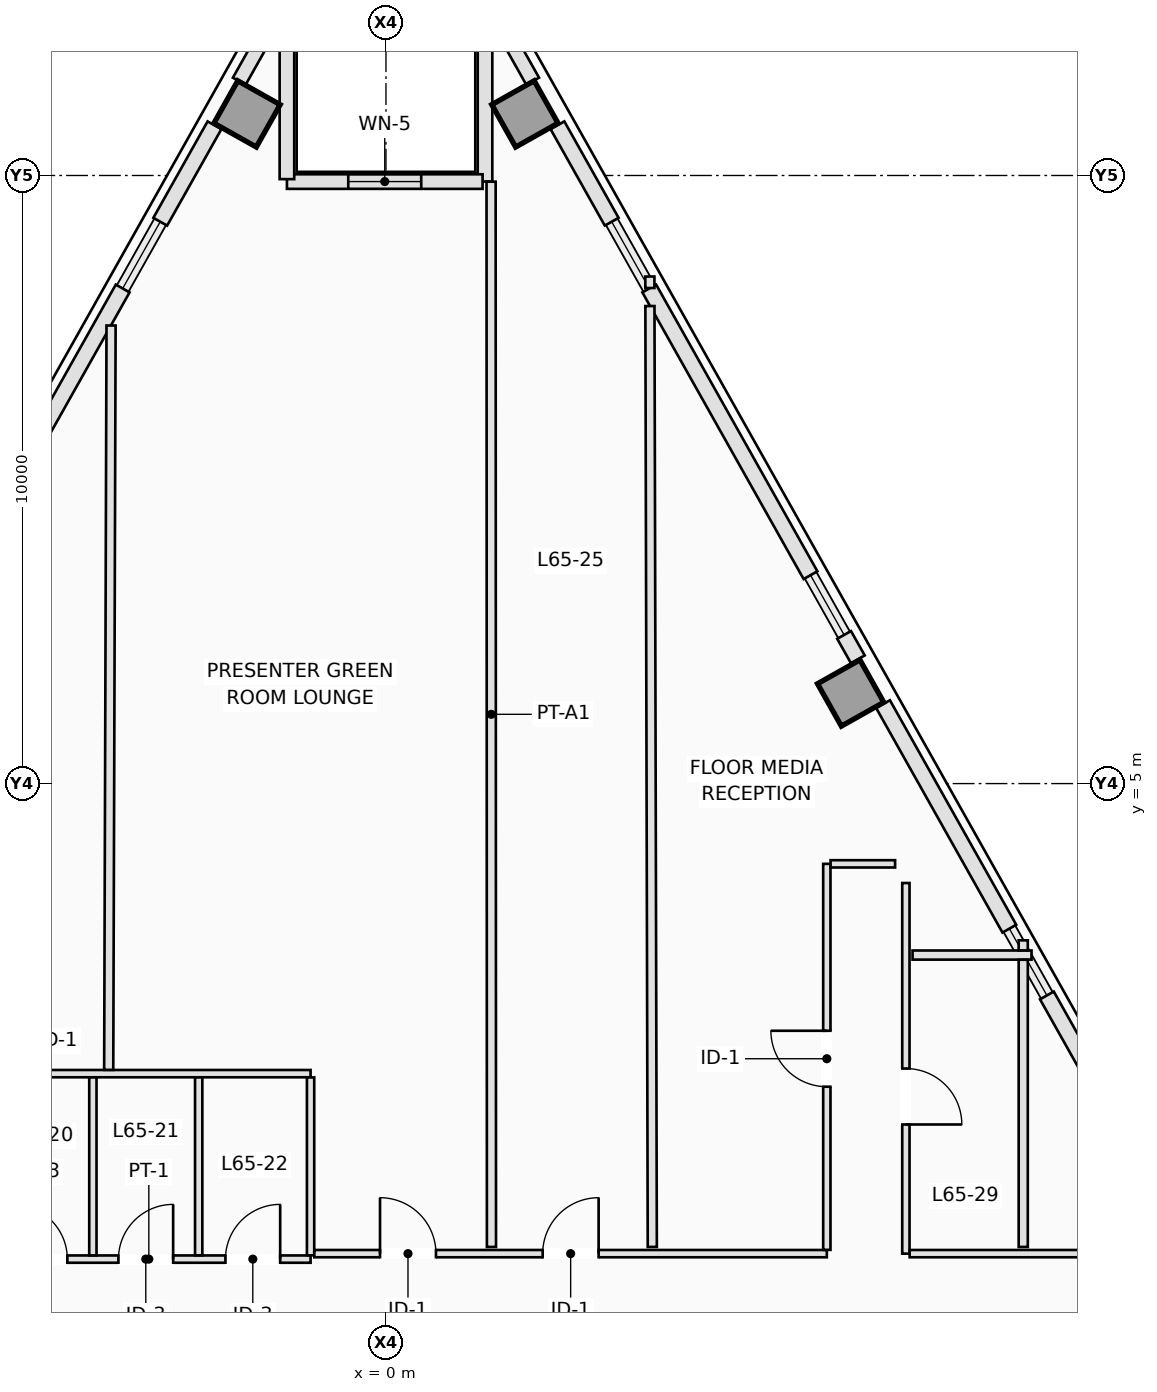
"""IFC4 building model, lengths in metres.
Left out: names, types, materials, properties, quantities, classifications, styles, units other than length and angle.
Written with IfcOpenShell. Run it as: python <this file> out.ifc"""

import sys

from ifc_helpers import new_model, si_unit, direction, frame, frame_2d, origin, origin_2d, place, context, subcontext, project, spatial, rectangle, extrude, element, fill, save


model = new_model("IFC4")
c1 = context("Model", 3, precision=1e-05, world=origin(), true_north=direction((0.0, 1.0)))
c2 = subcontext(c1, "Body", "Model", "MODEL_VIEW")
j1 = project(units=[si_unit("LENGTHUNIT", "METRE"), si_unit("PLANEANGLEUNIT", "RADIAN")], contexts=[c1])
p1 = place(None, origin())
s1 = spatial("IfcSite", under=j1, at=p1, CompositionType="ELEMENT")
p2 = place(p1, origin())
s2 = spatial("IfcBuilding", under=s1, at=p2, CompositionType="ELEMENT")
p3 = place(p2, frame((0.0, 0.0, 235.9)))
s3 = spatial("IfcBuildingStorey", under=s2, at=p3, CompositionType="ELEMENT", Elevation=235.9)
for number, where, z_axis, x_axis in (
    (1, (7.642, 6.489, 0.0), (0.0, 0.0, 1.0), (0.872, 0.49, 0.0)),
    (2, (2.285, 16.012, 0.0), (0.0, 0.0, 1.0), (0.872, 0.49, 0.0)),
    (3, (-2.285, 16.012, 0.0), (0.0, 0.0, 1.0), (-0.872, 0.49, 0.0)),
):
    element("IfcColumn", number, at=place(p3, frame(where, z_axis=z_axis, x_axis=x_axis)), inside=s3, PredefinedType="COLUMN", context=c2, shape_type="SweptSolid", body=[
        extrude(rectangle(XDim=0.8, YDim=0.8, at=origin_2d()), origin(), (0.0, 0.0, 1.0), 3.5),
    ])
p4 = place(p3, frame((1.95, 17.373, 0.0), z_axis=(0.0, 0.0, 1.0), x_axis=(0.490199895283, -0.871610040479, 0.0)))
e4 = element("IfcWall", 4, at=p4, inside=s3, PredefinedType="STANDARD", context=c2, shape_type="SweptSolid", body=[
    extrude(rectangle(XDim=0.945, YDim=0.24, at=frame_2d((0.472, 0.0))), origin(), (0.0, 0.0, 1.0), 3.25),
])
p5 = place(p3, frame((2.82, 15.826, 0.0), z_axis=(0.0, 0.0, 1.0), x_axis=(0.490261239633, -0.871575537125, 0.0)))
e5 = element("IfcWall", 5, at=p5, inside=s3, PredefinedType="STANDARD", context=c2, shape_type="SweptSolid", body=[
    extrude(rectangle(XDim=1.82, YDim=0.26, at=frame_2d((0.91, 0.0))), origin(), (0.0, 0.0, 1.0), 3.25),
])
p6 = place(p3, frame((4.33, 13.142, 0.0), z_axis=(0.0, 0.0, 1.0), x_axis=(0.490265525523, -0.871573126297, 0.0)))
e6 = element("IfcWall", 6, at=p6, inside=s3, PredefinedType="STANDARD", context=c2, shape_type="SweptSolid", body=[
    extrude(rectangle(XDim=5.409, YDim=0.26, at=frame_2d((2.705, 0.0))), origin(), (0.0, 0.0, 1.0), 3.25),
])
p7 = place(p3, frame((7.534, 7.445, 0.0), z_axis=(0.0, 0.0, 1.0), x_axis=(0.490412424957, -0.871490478116, 0.0)))
e7 = element("IfcWall", 7, at=p7, inside=s3, PredefinedType="STANDARD", context=c2, shape_type="SweptSolid", body=[
    extrude(rectangle(XDim=0.46, YDim=0.26, at=frame_2d((0.23, 0.0))), origin(), (0.0, 0.0, 1.0), 3.25),
])
p8 = place(p3, frame((8.174, 6.307, 0.0), z_axis=(0.0, 0.0, 1.0), x_axis=(0.490269447258, -0.871570920284, 0.0)))
e8 = element("IfcWall", 8, at=p8, inside=s3, PredefinedType="STANDARD", context=c2, shape_type="SweptSolid", body=[
    extrude(rectangle(XDim=4.237, YDim=0.26, at=frame_2d((2.118, 0.0))), origin(), (0.0, 0.0, 1.0), 3.25),
])
p9 = place(p3, frame((10.869, 1.516, 0.0), z_axis=(0.0, 0.0, 1.0), x_axis=(0.490244825075, -0.871584770109, 0.0)))
e9 = element("IfcWall", 9, at=p9, inside=s3, PredefinedType="STANDARD", context=c2, shape_type="SweptSolid", body=[
    extrude(rectangle(XDim=4.237, YDim=0.26, at=frame_2d((2.119, 0.0))), origin(), (0.0, 0.0, 1.0), 3.25),
])
p10 = place(p3, frame((-2.413, 16.549, 0.0), z_axis=(0.0, 0.0, 1.0), x_axis=(0.490199895283, 0.871610040479, 0.0)))
e10 = element("IfcWall", 10, at=p10, inside=s3, PredefinedType="STANDARD", context=c2, shape_type="SweptSolid", body=[
    extrude(rectangle(XDim=0.945, YDim=0.24, at=frame_2d((0.472, 0.0))), origin(), (0.0, 0.0, 1.0), 3.25),
])
p11 = place(p3, frame((-6.982, 8.427, 0.0), z_axis=(0.0, 0.0, 1.0), x_axis=(0.490265525523, 0.871573126297, 0.0)))
e11 = element("IfcWall", 11, at=p11, inside=s3, PredefinedType="STANDARD", context=c2, shape_type="SweptSolid", body=[
    extrude(rectangle(XDim=5.409, YDim=0.26, at=frame_2d((2.705, 0.0))), origin(), (0.0, 0.0, 1.0), 3.25),
])
p12 = place(p3, frame((-3.712, 14.24, 0.0), z_axis=(0.0, 0.0, 1.0), x_axis=(0.490261239633, 0.871575537125, 0.0)))
e12 = element("IfcWall", 12, at=p12, inside=s3, PredefinedType="STANDARD", context=c2, shape_type="SweptSolid", body=[
    extrude(rectangle(XDim=1.82, YDim=0.26, at=frame_2d((0.91, 0.0))), origin(), (0.0, 0.0, 1.0), 3.25),
])
p13 = place(p3, frame((1.629, 17.4, 0.0), z_axis=(0.0, 0.0, 1.0), x_axis=(0.0, -1.0, 0.0)))
e13 = element("IfcWall", 13, at=p13, inside=s3, PredefinedType="STANDARD", context=c2, shape_type="SweptSolid", body=[
    extrude(rectangle(XDim=2.5, YDim=0.24, at=frame_2d((1.25, 0.0))), origin(), (0.0, 0.0, 1.0), 3.25),
])
p14 = place(p3, frame((1.589, 14.9, 0.0), z_axis=(0.0, 0.0, 1.0), x_axis=(-1.0, 0.0, 0.0)))
e14 = element("IfcWall", 14, at=p14, inside=s3, PredefinedType="STANDARD", context=c2, shape_type="SweptSolid", body=[
    extrude(rectangle(XDim=3.218, YDim=0.24, at=frame_2d((1.609, 0.0))), origin(), (0.0, 0.0, 1.0), 3.25),
])
p15 = place(p14, frame((1.009, 0.0, 0.9)))
e15 = element("IfcOpeningElement", 15, at=p15, cuts=e14, PredefinedType="OPENING", context=c2, shape_type="SweptSolid", body=[
    extrude(rectangle(XDim=1.2, YDim=1.8, at=frame_2d((0.6, 0.9))), frame((0.0, 0.13, 0.0), z_axis=(0.0, -1.0, 0.0), x_axis=(1.0, 0.0, 0.0)), (0.0, 0.0, 1.0), 0.26),
])
p16 = place(p3, frame((-1.629, 14.94, 0.0), z_axis=(0.0, 0.0, 1.0), x_axis=(0.0, 1.0, 0.0)))
e16 = element("IfcWall", 16, at=p16, inside=s3, PredefinedType="STANDARD", context=c2, shape_type="SweptSolid", body=[
    extrude(rectangle(XDim=2.46, YDim=0.24, at=frame_2d((1.23, 0.0))), origin(), (0.0, 0.0, 1.0), 3.25),
])
p17 = place(p3, frame((-6.56, -2.82, 0.0), z_axis=(0.0, 0.0, 1.0), x_axis=(1.0, 0.0, 0.0)))
e17 = element("IfcWall", 17, at=p17, inside=s3, PredefinedType="PARTITIONING", context=c2, shape_type="SweptSolid", body=[
    extrude(rectangle(XDim=5.32, YDim=0.12, at=frame_2d((2.66, 0.0))), origin(), (0.0, 0.0, 1.0), 2.943),
])
p18 = place(p17, frame((0.42, 0.0, 0.0)))
e18 = element("IfcOpeningElement", 18, at=p18, cuts=e17, PredefinedType="OPENING", context=c2, shape_type="SweptSolid", body=[
    extrude(rectangle(XDim=0.9, YDim=2.12, at=frame_2d((0.45, 1.06))), frame((0.0, 0.07, 0.0), z_axis=(0.0, -1.0, 0.0), x_axis=(1.0, 0.0, 0.0)), (0.0, 0.0, 1.0), 0.14),
])
p19 = place(p17, frame((2.16, 0.0, 0.0)))
e19 = element("IfcOpeningElement", 19, at=p19, cuts=e17, PredefinedType="OPENING", context=c2, shape_type="SweptSolid", body=[
    extrude(rectangle(XDim=0.9, YDim=2.12, at=frame_2d((0.45, 1.06))), frame((0.0, 0.07, 0.0), z_axis=(0.0, -1.0, 0.0), x_axis=(1.0, 0.0, 0.0)), (0.0, 0.0, 1.0), 0.14),
])
p20 = place(p17, frame((3.92, 0.0, 0.0)))
e20 = element("IfcOpeningElement", 20, at=p20, cuts=e17, PredefinedType="OPENING", context=c2, shape_type="SweptSolid", body=[
    extrude(rectangle(XDim=0.9, YDim=2.12, at=frame_2d((0.45, 1.06))), frame((0.0, 0.07, 0.0), z_axis=(0.0, -1.0, 0.0), x_axis=(1.0, 0.0, 0.0)), (0.0, 0.0, 1.0), 0.14),
])
p21 = place(p3, frame((-6.56, 0.23, 0.0), z_axis=(0.0, 0.0, 1.0), x_axis=(1.0, 0.0, 0.0)))
e21 = element("IfcWall", 21, at=p21, inside=s3, PredefinedType="PARTITIONING", context=c2, shape_type="SweptSolid", body=[
    extrude(rectangle(XDim=5.32, YDim=0.12, at=frame_2d((2.66, 0.0))), origin(), (0.0, 0.0, 1.0), 3.25),
])
for number, where, z_axis, x_axis in (
    (22, (-4.82, -2.758, 0.0), (0.0, 0.0, 1.0), (0.0, 1.0, 0.0)),
    (23, (-3.08, -2.758, 0.0), (0.0, 0.0, 1.0), (0.0, 1.0, 0.0)),
    (24, (-1.24, -2.758, 0.0), (0.0, 0.0, 1.0), (0.0, 1.0, 0.0)),
):
    element("IfcWall", number, at=place(p3, frame(where, z_axis=z_axis, x_axis=x_axis)), inside=s3, PredefinedType="PARTITIONING", context=c2, shape_type="SweptSolid", body=[
        extrude(rectangle(XDim=2.926, YDim=0.12, at=frame_2d((1.463, 0.0))), origin(), (0.0, 0.0, 1.0), 3.25),
    ])
p22 = place(p3, frame((-1.178, -2.73, 0.0), z_axis=(0.0, 0.0, 1.0), x_axis=(1.0, 0.0, 0.0)))
e25 = element("IfcWall", 25, at=p22, inside=s3, PredefinedType="PARTITIONING", context=c2, shape_type="SweptSolid", body=[
    extrude(rectangle(XDim=8.428, YDim=0.12, at=frame_2d((4.214, 0.0))), origin(), (0.0, 0.0, 1.0), 2.943),
])
p23 = place(p22, frame((1.08, 0.0, 0.0)))
e26 = element("IfcOpeningElement", 26, at=p23, cuts=e25, PredefinedType="OPENING", context=c2, shape_type="SweptSolid", body=[
    extrude(rectangle(XDim=0.92, YDim=2.12, at=frame_2d((0.46, 1.06))), frame((0.0, 0.07, 0.0), z_axis=(0.0, -1.0, 0.0), x_axis=(1.0, 0.0, 0.0)), (0.0, 0.0, 1.0), 0.14),
])
p24 = place(p22, frame((3.755, 0.0, 0.0)))
e27 = element("IfcOpeningElement", 27, at=p24, cuts=e25, PredefinedType="OPENING", context=c2, shape_type="SweptSolid", body=[
    extrude(rectangle(XDim=0.92, YDim=2.12, at=frame_2d((0.46, 1.06))), frame((0.0, 0.07, 0.0), z_axis=(0.0, -1.0, 0.0), x_axis=(1.0, 0.0, 0.0)), (0.0, 0.0, 1.0), 0.14),
])
p25 = place(p3, frame((7.25, -2.668, 0.0), z_axis=(0.0, 0.0, 1.0), x_axis=(0.0, 1.0, 0.0)))
e28 = element("IfcWall", 28, at=p25, inside=s3, PredefinedType="PARTITIONING", context=c2, shape_type="SweptSolid", body=[
    extrude(rectangle(XDim=6.348, YDim=0.12, at=frame_2d((3.174, 0.0))), origin(), (0.0, 0.0, 1.0), 3.25),
])
p26 = place(p25, frame((2.683, 0.0, 0.0)))
e29 = element("IfcOpeningElement", 29, at=p26, cuts=e28, PredefinedType="OPENING", context=c2, shape_type="SweptSolid", body=[
    extrude(rectangle(XDim=0.92, YDim=2.12, at=frame_2d((0.46, 1.06))), frame((0.0, 0.07, 0.0), z_axis=(0.0, -1.0, 0.0), x_axis=(1.0, 0.0, 0.0)), (0.0, 0.0, 1.0), 0.14),
])
p27 = place(p3, frame((7.312, 3.68, 0.0), z_axis=(0.0, 0.0, 1.0), x_axis=(1.0, 0.0, 0.0)))
e30 = element("IfcWall", 30, at=p27, inside=s3, PredefinedType="PARTITIONING", context=c2, shape_type="SweptSolid", body=[
    extrude(rectangle(XDim=1.061, YDim=0.12, at=frame_2d((0.53, 0.0))), origin(), (0.0, 0.0, 1.0), 3.25),
])
p28 = place(p3, frame((8.55, 3.365, 0.0), z_axis=(0.0, 0.0, 1.0), x_axis=(0.0, -1.0, 0.0)))
e31 = element("IfcWall", 31, at=p28, inside=s3, PredefinedType="PARTITIONING", context=c2, shape_type="SweptSolid", body=[
    extrude(rectangle(XDim=6.095, YDim=0.12, at=frame_2d((3.047, 0.0))), origin(), (0.0, 0.0, 1.0), 3.25),
])
p29 = place(p28, frame((3.051, 0.0, 0.0)))
e32 = element("IfcOpeningElement", 32, at=p29, cuts=e31, PredefinedType="OPENING", context=c2, shape_type="SweptSolid", body=[
    extrude(rectangle(XDim=0.92, YDim=2.12, at=frame_2d((0.46, 1.06))), frame((0.0, 0.07, 0.0), z_axis=(0.0, -1.0, 0.0), x_axis=(1.0, 0.0, 0.0)), (0.0, 0.0, 1.0), 0.14),
])
p30 = place(p3, frame((8.612, -2.73, 0.0), z_axis=(0.0, 0.0, 1.0), x_axis=(1.0, 0.0, 0.0)))
e33 = element("IfcWall", 33, at=p30, inside=s3, PredefinedType="PARTITIONING", context=c2, shape_type="SweptSolid", body=[
    extrude(rectangle(XDim=3.288, YDim=0.12, at=frame_2d((1.644, 0.0))), origin(), (0.0, 0.0, 1.0), 3.25),
])
p31 = place(p3, frame((1.729, 14.898, 0.0), z_axis=(0.0, 0.0, 1.0), x_axis=(0.000334476108, -0.999999944063, 0.0)))
e34 = element("IfcWall", 34, at=p31, inside=s3, PredefinedType="PARTITIONING", context=c2, shape_type="SweptSolid", body=[
    extrude(rectangle(XDim=17.518, YDim=0.15, at=frame_2d((8.759, 0.0))), origin(), (0.0, 0.0, 1.0), 3.25),
])
p32 = place(p3, frame((-4.56, 0.292, 0.0), z_axis=(0.0, 0.0, 1.0), x_axis=(0.003171231411, 0.999994971633, 0.0)))
e35 = element("IfcWall", 35, at=p32, inside=s3, PredefinedType="PARTITIONING", context=c2, shape_type="SweptSolid", body=[
    extrude(rectangle(XDim=12.241, YDim=0.15, at=frame_2d((6.12, 0.0))), origin(), (0.0, 0.0, 1.0), 3.25),
])
p33 = place(p3, frame((4.34, 13.338, 0.0), z_axis=(0.0, 0.0, 1.0), x_axis=(0.002587313462, -0.999996652899, 0.0)))
e36 = element("IfcWall", 36, at=p33, inside=s3, PredefinedType="PARTITIONING", context=c2, shape_type="SweptSolid", body=[
    extrude(rectangle(XDim=0.189, YDim=0.15, at=frame_2d((0.094, 0.0))), origin(), (0.0, 0.0, 1.0), 3.25),
])
p34 = place(p3, frame((4.341, 12.853, 0.0), z_axis=(0.0, 0.0, 1.0), x_axis=(0.002508749087, -0.999996853084, 0.0)))
e37 = element("IfcWall", 37, at=p34, inside=s3, PredefinedType="PARTITIONING", context=c2, shape_type="SweptSolid", body=[
    extrude(rectangle(XDim=15.473, YDim=0.15, at=frame_2d((7.737, 0.0))), origin(), (0.0, 0.0, 1.0), 3.25),
])
p35 = place(p3, frame((10.616, 2.18, 0.0), z_axis=(0.0, 0.0, 1.0), x_axis=(-1.0, 0.0, 0.0)))
e38 = element("IfcWall", 38, at=p35, inside=s3, PredefinedType="PARTITIONING", context=c2, shape_type="SweptSolid", body=[
    extrude(rectangle(XDim=1.956, YDim=0.15, at=frame_2d((0.978, 0.0))), origin(), (0.0, 0.0, 1.0), 3.25),
])
p36 = place(p3, frame((10.48, 2.422, 0.0), z_axis=(0.0, 0.0, 1.0), x_axis=(0.0, -1.0, 0.0)))
e39 = element("IfcWall", 39, at=p36, inside=s3, PredefinedType="PARTITIONING", context=c2, shape_type="SweptSolid", body=[
    extrude(rectangle(XDim=0.165, YDim=0.15, at=frame_2d((0.083, 0.0))), origin(), (0.0, 0.0, 1.0), 3.25),
])
p37 = place(p3, frame((10.48, 2.103, 0.0), z_axis=(0.0, 0.0, 1.0), x_axis=(0.0, -1.0, 0.0)))
e40 = element("IfcWall", 40, at=p37, inside=s3, PredefinedType="PARTITIONING", context=c2, shape_type="SweptSolid", body=[
    extrude(rectangle(XDim=4.723, YDim=0.15, at=frame_2d((2.362, 0.0))), origin(), (0.0, 0.0, 1.0), 3.25),
])
p38 = place(p15, origin())
e41 = element("IfcWindow", 41, at=p38, inside=s3, PartitioningType="SINGLE_PANEL", PredefinedType="WINDOW", context=c2, shape_type="SweptSolid", body=[
    extrude(rectangle(XDim=1.2, YDim=1.8, at=frame_2d((0.6, 0.9))), frame((0.0, 0.03, 0.0), z_axis=(0.0, -1.0, 0.0), x_axis=(1.0, 0.0, 0.0)), (0.0, 0.0, 1.0), 0.06),
])
fill(e15, e41)
p39 = place(p18, origin())
e42 = element("IfcDoor", 42, at=p39, inside=s3, OperationType="SINGLE_SWING_LEFT", PredefinedType="DOOR", context=c2, shape_type="SweptSolid", body=[
    extrude(rectangle(XDim=0.9, YDim=2.12, at=frame_2d((0.45, 1.06))), frame((0.0, 0.025, 0.0), z_axis=(0.0, -1.0, 0.0), x_axis=(1.0, 0.0, 0.0)), (0.0, 0.0, 1.0), 0.05),
])
fill(e18, e42)
p40 = place(p19, origin())
e43 = element("IfcDoor", 43, at=p40, inside=s3, OperationType="SINGLE_SWING_RIGHT", PredefinedType="DOOR", context=c2, shape_type="SweptSolid", body=[
    extrude(rectangle(XDim=0.9, YDim=2.12, at=frame_2d((0.45, 1.06))), frame((0.0, 0.025, 0.0), z_axis=(0.0, -1.0, 0.0), x_axis=(1.0, 0.0, 0.0)), (0.0, 0.0, 1.0), 0.05),
])
fill(e19, e43)
p41 = place(p20, origin())
e44 = element("IfcDoor", 44, at=p41, inside=s3, OperationType="SINGLE_SWING_RIGHT", PredefinedType="DOOR", context=c2, shape_type="SweptSolid", body=[
    extrude(rectangle(XDim=0.9, YDim=2.12, at=frame_2d((0.45, 1.06))), frame((0.0, 0.025, 0.0), z_axis=(0.0, -1.0, 0.0), x_axis=(1.0, 0.0, 0.0)), (0.0, 0.0, 1.0), 0.05),
])
fill(e20, e44)
p42 = place(p23, origin())
e45 = element("IfcDoor", 45, at=p42, inside=s3, OperationType="SINGLE_SWING_LEFT", PredefinedType="DOOR", context=c2, shape_type="SweptSolid", body=[
    extrude(rectangle(XDim=0.92, YDim=2.12, at=frame_2d((0.46, 1.06))), frame((0.0, 0.025, 0.0), z_axis=(0.0, -1.0, 0.0), x_axis=(1.0, 0.0, 0.0)), (0.0, 0.0, 1.0), 0.05),
])
fill(e26, e45)
p43 = place(p24, origin())
e46 = element("IfcDoor", 46, at=p43, inside=s3, OperationType="SINGLE_SWING_RIGHT", PredefinedType="DOOR", context=c2, shape_type="SweptSolid", body=[
    extrude(rectangle(XDim=0.92, YDim=2.12, at=frame_2d((0.46, 1.06))), frame((0.0, 0.025, 0.0), z_axis=(0.0, -1.0, 0.0), x_axis=(1.0, 0.0, 0.0)), (0.0, 0.0, 1.0), 0.05),
])
fill(e27, e46)
p44 = place(p26, origin())
e47 = element("IfcDoor", 47, at=p44, inside=s3, OperationType="SINGLE_SWING_RIGHT", PredefinedType="DOOR", context=c2, shape_type="SweptSolid", body=[
    extrude(rectangle(XDim=0.92, YDim=2.12, at=frame_2d((0.46, 1.06))), frame((0.0, 0.025, 0.0), z_axis=(0.0, -1.0, 0.0), x_axis=(1.0, 0.0, 0.0)), (0.0, 0.0, 1.0), 0.05),
])
fill(e29, e47)
p45 = place(p29, origin())
e48 = element("IfcDoor", 48, at=p45, inside=s3, OperationType="SINGLE_SWING_RIGHT", PredefinedType="DOOR", context=c2, shape_type="SweptSolid", body=[
    extrude(rectangle(XDim=0.92, YDim=2.12, at=frame_2d((0.46, 1.06))), frame((0.0, 0.025, 0.0), z_axis=(0.0, -1.0, 0.0), x_axis=(1.0, 0.0, 0.0)), (0.0, 0.0, 1.0), 0.05),
])
fill(e32, e48)
save(model, sys.argv[1])
